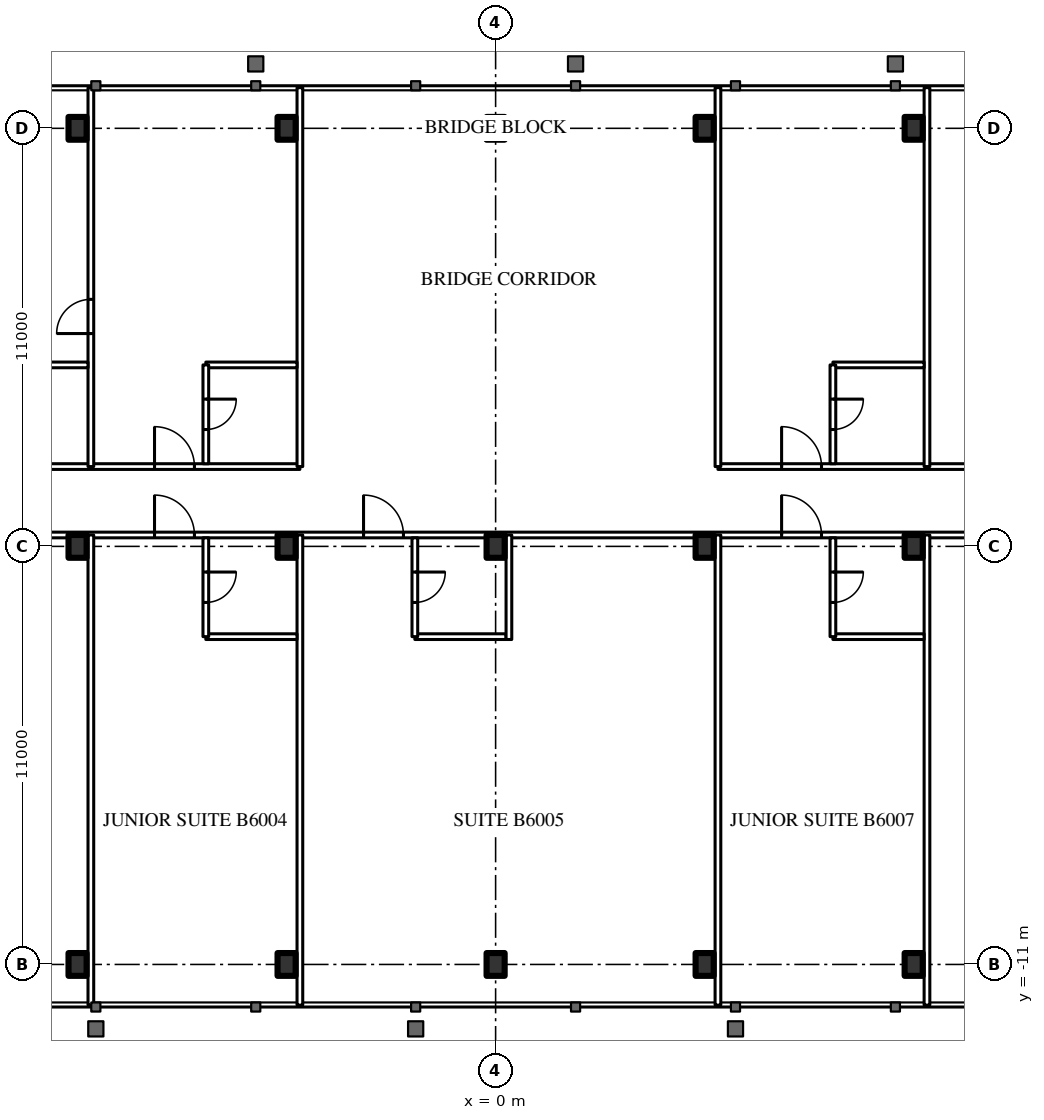
"""IFC4 building model, lengths in metres.
Left out: names, types, materials, properties, quantities, classifications, styles, units other than length and angle.
Written with IfcOpenShell. Run it as: python <this file> out.ifc"""

import sys

from ifc_helpers import new_model, si_unit, direction, frame, frame_2d, origin, origin_2d, place, context, subcontext, project, spatial, rectangle, i_section, extrude, element, fill, save


model = new_model("IFC4")
c1 = context("Model", 3, precision=1e-05, world=origin(), true_north=direction((0.0, 1.0)))
c2 = subcontext(c1, "Body", "Model", "MODEL_VIEW")
j1 = project(units=[si_unit("LENGTHUNIT", "METRE"), si_unit("PLANEANGLEUNIT", "RADIAN")], contexts=[c1])
p1 = place(None, origin())
s1 = spatial("IfcSite", under=j1, at=p1, CompositionType="ELEMENT")
p2 = place(p1, origin())
s2 = spatial("IfcBuilding", under=s1, at=p2, CompositionType="ELEMENT")
p3 = place(p2, frame((0.0, 0.0, 226.1)))
s3 = spatial("IfcBuildingStorey", under=s2, at=p3, CompositionType="ELEMENT", Elevation=226.1)
for number, where, z_axis, x_axis in (
    (1, (-11.0, -11.0, 0.0), (0.0, 0.0, 1.0), (1.0, 0.0, 0.0)),
    (2, (-5.5, -11.0, 0.0), (0.0, 0.0, 1.0), (1.0, 0.0, 0.0)),
    (3, (0.0, -11.0, 0.0), (0.0, 0.0, 1.0), (1.0, 0.0, 0.0)),
    (4, (5.5, -11.0, 0.0), (0.0, 0.0, 1.0), (1.0, 0.0, 0.0)),
    (5, (11.0, -11.0, 0.0), (0.0, 0.0, 1.0), (1.0, 0.0, 0.0)),
    (6, (-11.0, 0.0, 0.0), (0.0, 0.0, 1.0), (1.0, 0.0, 0.0)),
    (7, (-5.5, 0.0, 0.0), (0.0, 0.0, 1.0), (1.0, 0.0, 0.0)),
    (8, (0.0, 0.0, 0.0), (0.0, 0.0, 1.0), (1.0, 0.0, 0.0)),
    (9, (5.5, 0.0, 0.0), (0.0, 0.0, 1.0), (1.0, 0.0, 0.0)),
    (10, (11.0, 0.0, 0.0), (0.0, 0.0, 1.0), (1.0, 0.0, 0.0)),
    (11, (-11.0, 11.0, 0.0), (0.0, 0.0, 1.0), (1.0, 0.0, 0.0)),
    (12, (-5.5, 11.0, 0.0), (0.0, 0.0, 1.0), (1.0, 0.0, 0.0)),
    (13, (0.0, 11.0, 0.0), (0.0, 0.0, 1.0), (1.0, 0.0, 0.0)),
    (14, (5.5, 11.0, 0.0), (0.0, 0.0, 1.0), (1.0, 0.0, 0.0)),
    (15, (11.0, 11.0, 0.0), (0.0, 0.0, 1.0), (1.0, 0.0, 0.0)),
):
    element("IfcColumn", number, at=place(p3, frame(where, z_axis=z_axis, x_axis=x_axis)), inside=s3, PredefinedType="COLUMN", context=c2, shape_type="SweptSolid", body=[
        extrude(i_section(OverallWidth=0.476, OverallDepth=0.6, WebThickness=0.1, FlangeThickness=0.14, FilletRadius=0.02, at=origin_2d()), origin(), (0.0, 0.0, 1.0), 3.6),
    ])
p4 = place(p3, frame((-27.5, 0.3, 0.0), z_axis=(0.0, 0.0, 1.0), x_axis=(1.0, 0.0, 0.0)))
e16 = element("IfcWall", 16, at=p4, inside=s3, PredefinedType="PARTITIONING", context=c2, shape_type="SweptSolid", body=[
    extrude(rectangle(XDim=55.0, YDim=0.15, at=frame_2d((27.5, 0.0))), origin(), (0.0, 0.0, 1.0), 2.4),
])
p5 = place(p4, frame((1.575, 0.0, 0.0)))
e17 = element("IfcOpeningElement", 17, at=p5, cuts=e16, PredefinedType="OPENING", context=c2, shape_type="SweptSolid", body=[
    extrude(rectangle(XDim=1.0, YDim=2.2, at=frame_2d((0.5, 1.1))), frame((0.0, 0.085, 0.0), z_axis=(0.0, -1.0, 0.0), x_axis=(1.0, 0.0, 0.0)), (0.0, 0.0, 1.0), 0.17),
])
p6 = place(p4, frame((7.525, 0.0, 0.0)))
e18 = element("IfcOpeningElement", 18, at=p6, cuts=e16, PredefinedType="OPENING", context=c2, shape_type="SweptSolid", body=[
    extrude(rectangle(XDim=1.05, YDim=2.4, at=frame_2d((0.525, 1.2))), frame((0.0, 0.085, 0.0), z_axis=(0.0, -1.0, 0.0), x_axis=(1.0, 0.0, 0.0)), (0.0, 0.0, 1.0), 0.17),
])
p7 = place(p4, frame((18.525, 0.0, 0.0)))
e19 = element("IfcOpeningElement", 19, at=p7, cuts=e16, PredefinedType="OPENING", context=c2, shape_type="SweptSolid", body=[
    extrude(rectangle(XDim=1.05, YDim=2.4, at=frame_2d((0.525, 1.2))), frame((0.0, 0.085, 0.0), z_axis=(0.0, -1.0, 0.0), x_axis=(1.0, 0.0, 0.0)), (0.0, 0.0, 1.0), 0.17),
])
p8 = place(p4, frame((24.025, 0.0, 0.0)))
e20 = element("IfcOpeningElement", 20, at=p8, cuts=e16, PredefinedType="OPENING", context=c2, shape_type="SweptSolid", body=[
    extrude(rectangle(XDim=1.05, YDim=2.4, at=frame_2d((0.525, 1.2))), frame((0.0, 0.085, 0.0), z_axis=(0.0, -1.0, 0.0), x_axis=(1.0, 0.0, 0.0)), (0.0, 0.0, 1.0), 0.17),
])
p9 = place(p4, frame((35.025, 0.0, 0.0)))
e21 = element("IfcOpeningElement", 21, at=p9, cuts=e16, PredefinedType="OPENING", context=c2, shape_type="SweptSolid", body=[
    extrude(rectangle(XDim=1.05, YDim=2.4, at=frame_2d((0.525, 1.2))), frame((0.0, 0.085, 0.0), z_axis=(0.0, -1.0, 0.0), x_axis=(1.0, 0.0, 0.0)), (0.0, 0.0, 1.0), 0.17),
])
p10 = place(p4, frame((40.525, 0.0, 0.0)))
e22 = element("IfcOpeningElement", 22, at=p10, cuts=e16, PredefinedType="OPENING", context=c2, shape_type="SweptSolid", body=[
    extrude(rectangle(XDim=1.05, YDim=2.4, at=frame_2d((0.525, 1.2))), frame((0.0, 0.085, 0.0), z_axis=(0.0, -1.0, 0.0), x_axis=(1.0, 0.0, 0.0)), (0.0, 0.0, 1.0), 0.17),
])
p11 = place(p4, frame((52.525, 0.0, 0.0)))
e23 = element("IfcOpeningElement", 23, at=p11, cuts=e16, PredefinedType="OPENING", context=c2, shape_type="SweptSolid", body=[
    extrude(rectangle(XDim=1.05, YDim=2.4, at=frame_2d((0.525, 1.2))), frame((0.0, 0.085, 0.0), z_axis=(0.0, -1.0, 0.0), x_axis=(1.0, 0.0, 0.0)), (0.0, 0.0, 1.0), 0.17),
])
p12 = place(p3, frame((-27.5, 2.1, 0.0), z_axis=(0.0, 0.0, 1.0), x_axis=(1.0, 0.0, 0.0)))
e24 = element("IfcWall", 24, at=p12, inside=s3, PredefinedType="PARTITIONING", context=c2, shape_type="SweptSolid", body=[
    extrude(rectangle(XDim=22.35, YDim=0.15, at=frame_2d((11.175, 0.0))), origin(), (0.0, 0.0, 1.0), 3.4),
])
p13 = place(p12, frame((2.025, 0.0, 0.0)))
e25 = element("IfcOpeningElement", 25, at=p13, cuts=e24, PredefinedType="OPENING", context=c2, shape_type="SweptSolid", body=[
    extrude(rectangle(XDim=1.05, YDim=2.4, at=frame_2d((0.525, 1.2))), frame((0.0, 0.085, 0.0), z_axis=(0.0, -1.0, 0.0), x_axis=(1.0, 0.0, 0.0)), (0.0, 0.0, 1.0), 0.17),
])
p14 = place(p12, frame((7.525, 0.0, 0.0)))
e26 = element("IfcOpeningElement", 26, at=p14, cuts=e24, PredefinedType="OPENING", context=c2, shape_type="SweptSolid", body=[
    extrude(rectangle(XDim=1.05, YDim=2.4, at=frame_2d((0.525, 1.2))), frame((0.0, 0.085, 0.0), z_axis=(0.0, -1.0, 0.0), x_axis=(1.0, 0.0, 0.0)), (0.0, 0.0, 1.0), 0.17),
])
p15 = place(p12, frame((13.025, 0.0, 0.0)))
e27 = element("IfcOpeningElement", 27, at=p15, cuts=e24, PredefinedType="OPENING", context=c2, shape_type="SweptSolid", body=[
    extrude(rectangle(XDim=1.05, YDim=2.4, at=frame_2d((0.525, 1.2))), frame((0.0, 0.085, 0.0), z_axis=(0.0, -1.0, 0.0), x_axis=(1.0, 0.0, 0.0)), (0.0, 0.0, 1.0), 0.17),
])
p16 = place(p12, frame((18.525, 0.0, 0.0)))
e28 = element("IfcOpeningElement", 28, at=p16, cuts=e24, PredefinedType="OPENING", context=c2, shape_type="SweptSolid", body=[
    extrude(rectangle(XDim=1.05, YDim=2.4, at=frame_2d((0.525, 1.2))), frame((0.0, 0.085, 0.0), z_axis=(0.0, -1.0, 0.0), x_axis=(1.0, 0.0, 0.0)), (0.0, 0.0, 1.0), 0.17),
])
p17 = place(p3, frame((5.85, 2.1, 0.0), z_axis=(0.0, 0.0, 1.0), x_axis=(1.0, 0.0, 0.0)))
e29 = element("IfcWall", 29, at=p17, inside=s3, PredefinedType="PARTITIONING", context=c2, shape_type="SweptSolid", body=[
    extrude(rectangle(XDim=21.65, YDim=0.15, at=frame_2d((10.825, 0.0))), origin(), (0.0, 0.0, 1.0), 3.4),
])
p18 = place(p17, frame((1.675, 0.0, 0.0)))
e30 = element("IfcOpeningElement", 30, at=p18, cuts=e29, PredefinedType="OPENING", context=c2, shape_type="SweptSolid", body=[
    extrude(rectangle(XDim=1.05, YDim=2.4, at=frame_2d((0.525, 1.2))), frame((0.0, 0.085, 0.0), z_axis=(0.0, -1.0, 0.0), x_axis=(1.0, 0.0, 0.0)), (0.0, 0.0, 1.0), 0.17),
])
p19 = place(p17, frame((7.175, 0.0, 0.0)))
e31 = element("IfcOpeningElement", 31, at=p19, cuts=e29, PredefinedType="OPENING", context=c2, shape_type="SweptSolid", body=[
    extrude(rectangle(XDim=1.05, YDim=2.4, at=frame_2d((0.525, 1.2))), frame((0.0, 0.085, 0.0), z_axis=(0.0, -1.0, 0.0), x_axis=(1.0, 0.0, 0.0)), (0.0, 0.0, 1.0), 0.17),
])
p20 = place(p17, frame((19.175, 0.0, 0.0)))
e32 = element("IfcOpeningElement", 32, at=p20, cuts=e29, PredefinedType="OPENING", context=c2, shape_type="SweptSolid", body=[
    extrude(rectangle(XDim=1.05, YDim=2.4, at=frame_2d((0.525, 1.2))), frame((0.0, 0.085, 0.0), z_axis=(0.0, -1.0, 0.0), x_axis=(1.0, 0.0, 0.0)), (0.0, 0.0, 1.0), 0.17),
])
for number, where, z_axis, x_axis in (
    (33, (-10.65, -12.07, 0.0), (0.0, 0.0, 1.0), (0.0, 1.0, 0.0)),
    (34, (-5.15, -12.07, 0.0), (0.0, 0.0, 1.0), (0.0, 1.0, 0.0)),
    (35, (5.85, -12.07, 0.0), (0.0, 0.0, 1.0), (0.0, 1.0, 0.0)),
    (36, (11.35, -12.07, 0.0), (0.0, 0.0, 1.0), (0.0, 1.0, 0.0)),
):
    element("IfcWall", number, at=place(p3, frame(where, z_axis=z_axis, x_axis=x_axis)), inside=s3, PredefinedType="PARTITIONING", context=c2, shape_type="SweptSolid", body=[
        extrude(rectangle(XDim=12.37, YDim=0.15, at=frame_2d((6.185, 0.0))), origin(), (0.0, 0.0, 1.0), 3.4),
    ])
p21 = place(p3, frame((-7.625, -2.375, 0.0), z_axis=(0.0, 0.0, 1.0), x_axis=(1.0, 0.0, 0.0)))
e37 = element("IfcWall", 37, at=p21, inside=s3, PredefinedType="PARTITIONING", context=c2, shape_type="SweptSolid", body=[
    extrude(rectangle(XDim=2.4, YDim=0.15, at=frame_2d((1.2, 0.0))), origin(), (0.0, 0.0, 1.0), 3.4),
])
p22 = place(p3, frame((-7.625, -2.375, 0.0), z_axis=(0.0, 0.0, 1.0), x_axis=(0.0, 1.0, 0.0)))
e38 = element("IfcWall", 38, at=p22, inside=s3, PredefinedType="PARTITIONING", context=c2, shape_type="SweptSolid", body=[
    extrude(rectangle(XDim=2.6, YDim=0.15, at=frame_2d((1.3, 0.0))), origin(), (0.0, 0.0, 1.0), 3.4),
])
p23 = place(p22, frame((0.9, 0.0, 0.0)))
e39 = element("IfcOpeningElement", 39, at=p23, cuts=e38, PredefinedType="OPENING", context=c2, shape_type="SweptSolid", body=[
    extrude(rectangle(XDim=0.8, YDim=2.2, at=frame_2d((0.4, 1.1))), frame((0.0, 0.085, 0.0), z_axis=(0.0, -1.0, 0.0), x_axis=(1.0, 0.0, 0.0)), (0.0, 0.0, 1.0), 0.17),
])
p24 = place(p3, frame((-2.125, -2.375, 0.0), z_axis=(0.0, 0.0, 1.0), x_axis=(1.0, 0.0, 0.0)))
e40 = element("IfcWall", 40, at=p24, inside=s3, PredefinedType="PARTITIONING", context=c2, shape_type="SweptSolid", body=[
    extrude(rectangle(XDim=2.4, YDim=0.15, at=frame_2d((1.2, 0.0))), origin(), (0.0, 0.0, 1.0), 3.4),
])
p25 = place(p3, frame((-2.125, -2.375, 0.0), z_axis=(0.0, 0.0, 1.0), x_axis=(0.0, 1.0, 0.0)))
e41 = element("IfcWall", 41, at=p25, inside=s3, PredefinedType="PARTITIONING", context=c2, shape_type="SweptSolid", body=[
    extrude(rectangle(XDim=2.6, YDim=0.15, at=frame_2d((1.3, 0.0))), origin(), (0.0, 0.0, 1.0), 3.4),
])
p26 = place(p25, frame((0.9, 0.0, 0.0)))
e42 = element("IfcOpeningElement", 42, at=p26, cuts=e41, PredefinedType="OPENING", context=c2, shape_type="SweptSolid", body=[
    extrude(rectangle(XDim=0.8, YDim=2.2, at=frame_2d((0.4, 1.1))), frame((0.0, 0.085, 0.0), z_axis=(0.0, -1.0, 0.0), x_axis=(1.0, 0.0, 0.0)), (0.0, 0.0, 1.0), 0.17),
])
p27 = place(p3, frame((8.875, -2.375, 0.0), z_axis=(0.0, 0.0, 1.0), x_axis=(1.0, 0.0, 0.0)))
e43 = element("IfcWall", 43, at=p27, inside=s3, PredefinedType="PARTITIONING", context=c2, shape_type="SweptSolid", body=[
    extrude(rectangle(XDim=2.4, YDim=0.15, at=frame_2d((1.2, 0.0))), origin(), (0.0, 0.0, 1.0), 3.4),
])
p28 = place(p3, frame((8.875, -2.375, 0.0), z_axis=(0.0, 0.0, 1.0), x_axis=(0.0, 1.0, 0.0)))
e44 = element("IfcWall", 44, at=p28, inside=s3, PredefinedType="PARTITIONING", context=c2, shape_type="SweptSolid", body=[
    extrude(rectangle(XDim=2.6, YDim=0.15, at=frame_2d((1.3, 0.0))), origin(), (0.0, 0.0, 1.0), 3.4),
])
p29 = place(p28, frame((0.9, 0.0, 0.0)))
e45 = element("IfcOpeningElement", 45, at=p29, cuts=e44, PredefinedType="OPENING", context=c2, shape_type="SweptSolid", body=[
    extrude(rectangle(XDim=0.8, YDim=2.2, at=frame_2d((0.4, 1.1))), frame((0.0, 0.085, 0.0), z_axis=(0.0, -1.0, 0.0), x_axis=(1.0, 0.0, 0.0)), (0.0, 0.0, 1.0), 0.17),
])
p30 = place(p3, frame((-10.65, 2.1, 0.0), z_axis=(0.0, 0.0, 1.0), x_axis=(0.0, 1.0, 0.0)))
e46 = element("IfcWall", 46, at=p30, inside=s3, PredefinedType="PARTITIONING", context=c2, shape_type="SweptSolid", body=[
    extrude(rectangle(XDim=9.97, YDim=0.15, at=frame_2d((4.985, 0.0))), origin(), (0.0, 0.0, 1.0), 3.4),
])
p31 = place(p30, frame((3.5, 0.0, 0.0)))
e47 = element("IfcOpeningElement", 47, at=p31, cuts=e46, PredefinedType="OPENING", context=c2, shape_type="SweptSolid", body=[
    extrude(rectangle(XDim=0.9, YDim=2.2, at=frame_2d((0.45, 1.1))), frame((0.0, 0.085, 0.0), z_axis=(0.0, -1.0, 0.0), x_axis=(1.0, 0.0, 0.0)), (0.0, 0.0, 1.0), 0.17),
])
for number, where, z_axis, x_axis in (
    (48, (-5.15, 2.1, 0.0), (0.0, 0.0, 1.0), (0.0, 1.0, 0.0)),
    (49, (5.85, 2.1, 0.0), (0.0, 0.0, 1.0), (0.0, 1.0, 0.0)),
    (50, (11.35, 2.1, 0.0), (0.0, 0.0, 1.0), (0.0, 1.0, 0.0)),
):
    element("IfcWall", number, at=place(p3, frame(where, z_axis=z_axis, x_axis=x_axis)), inside=s3, PredefinedType="PARTITIONING", context=c2, shape_type="SweptSolid", body=[
        extrude(rectangle(XDim=9.97, YDim=0.15, at=frame_2d((4.985, 0.0))), origin(), (0.0, 0.0, 1.0), 3.4),
    ])
for number, where, z_axis, x_axis in (
    (51, (-13.125, 4.775, 0.0), (0.0, 0.0, 1.0), (1.0, 0.0, 0.0)),
    (52, (-7.625, 4.775, 0.0), (0.0, 0.0, 1.0), (1.0, 0.0, 0.0)),
):
    element("IfcWall", number, at=place(p3, frame(where, z_axis=z_axis, x_axis=x_axis)), inside=s3, PredefinedType="PARTITIONING", context=c2, shape_type="SweptSolid", body=[
        extrude(rectangle(XDim=2.4, YDim=0.15, at=frame_2d((1.2, 0.0))), origin(), (0.0, 0.0, 1.0), 3.4),
    ])
p32 = place(p3, frame((-7.625, 2.175, 0.0), z_axis=(0.0, 0.0, 1.0), x_axis=(0.0, 1.0, 0.0)))
e53 = element("IfcWall", 53, at=p32, inside=s3, PredefinedType="PARTITIONING", context=c2, shape_type="SweptSolid", body=[
    extrude(rectangle(XDim=2.6, YDim=0.15, at=frame_2d((1.3, 0.0))), origin(), (0.0, 0.0, 1.0), 3.4),
])
p33 = place(p32, frame((0.9, 0.0, 0.0)))
e54 = element("IfcOpeningElement", 54, at=p33, cuts=e53, PredefinedType="OPENING", context=c2, shape_type="SweptSolid", body=[
    extrude(rectangle(XDim=0.8, YDim=2.2, at=frame_2d((0.4, 1.1))), frame((0.0, 0.085, 0.0), z_axis=(0.0, -1.0, 0.0), x_axis=(1.0, 0.0, 0.0)), (0.0, 0.0, 1.0), 0.17),
])
p34 = place(p3, frame((8.875, 4.775, 0.0), z_axis=(0.0, 0.0, 1.0), x_axis=(1.0, 0.0, 0.0)))
e55 = element("IfcWall", 55, at=p34, inside=s3, PredefinedType="PARTITIONING", context=c2, shape_type="SweptSolid", body=[
    extrude(rectangle(XDim=2.4, YDim=0.15, at=frame_2d((1.2, 0.0))), origin(), (0.0, 0.0, 1.0), 3.4),
])
p35 = place(p3, frame((8.875, 2.175, 0.0), z_axis=(0.0, 0.0, 1.0), x_axis=(0.0, 1.0, 0.0)))
e56 = element("IfcWall", 56, at=p35, inside=s3, PredefinedType="PARTITIONING", context=c2, shape_type="SweptSolid", body=[
    extrude(rectangle(XDim=2.6, YDim=0.15, at=frame_2d((1.3, 0.0))), origin(), (0.0, 0.0, 1.0), 3.4),
])
p36 = place(p35, frame((0.9, 0.0, 0.0)))
e57 = element("IfcOpeningElement", 57, at=p36, cuts=e56, PredefinedType="OPENING", context=c2, shape_type="SweptSolid", body=[
    extrude(rectangle(XDim=0.8, YDim=2.2, at=frame_2d((0.4, 1.1))), frame((0.0, 0.085, 0.0), z_axis=(0.0, -1.0, 0.0), x_axis=(1.0, 0.0, 0.0)), (0.0, 0.0, 1.0), 0.17),
])
p37 = place(p3, frame((0.35, -2.45, 0.0), z_axis=(0.0, 0.0, 1.0), x_axis=(0.0, 1.0, 0.0)))
e58 = element("IfcWall", 58, at=p37, inside=s3, PredefinedType="PARTITIONING", context=c2, shape_type="SweptSolid", body=[
    extrude(rectangle(XDim=2.75, YDim=0.15, at=frame_2d((1.375, 0.0))), origin(), (0.0, 0.0, 1.0), 3.4),
])
p38 = place(p23, origin())
e59 = element("IfcDoor", 59, at=p38, inside=s3, OperationType="SINGLE_SWING_RIGHT", PredefinedType="DOOR", context=c2, shape_type="SweptSolid", body=[
    extrude(rectangle(XDim=0.8, YDim=2.2, at=frame_2d((0.4, 1.1))), frame((0.0, 0.025, 0.0), z_axis=(0.0, -1.0, 0.0), x_axis=(1.0, 0.0, 0.0)), (0.0, 0.0, 1.0), 0.05),
])
fill(e39, e59)
p39 = place(p7, origin())
e60 = element("IfcDoor", 60, at=p39, inside=s3, OperationType="SINGLE_SWING_LEFT", PredefinedType="DOOR", context=c2, shape_type="SweptSolid", body=[
    extrude(rectangle(XDim=1.05, YDim=2.4, at=frame_2d((0.525, 1.2))), frame((0.0, 0.025, 0.0), z_axis=(0.0, -1.0, 0.0), x_axis=(1.0, 0.0, 0.0)), (0.0, 0.0, 1.0), 0.05),
])
fill(e19, e60)
p40 = place(p26, origin())
e61 = element("IfcDoor", 61, at=p40, inside=s3, OperationType="SINGLE_SWING_RIGHT", PredefinedType="DOOR", context=c2, shape_type="SweptSolid", body=[
    extrude(rectangle(XDim=0.8, YDim=2.2, at=frame_2d((0.4, 1.1))), frame((0.0, 0.025, 0.0), z_axis=(0.0, -1.0, 0.0), x_axis=(1.0, 0.0, 0.0)), (0.0, 0.0, 1.0), 0.05),
])
fill(e42, e61)
p41 = place(p8, origin())
e62 = element("IfcDoor", 62, at=p41, inside=s3, OperationType="SINGLE_SWING_LEFT", PredefinedType="DOOR", context=c2, shape_type="SweptSolid", body=[
    extrude(rectangle(XDim=1.05, YDim=2.4, at=frame_2d((0.525, 1.2))), frame((0.0, 0.025, 0.0), z_axis=(0.0, -1.0, 0.0), x_axis=(1.0, 0.0, 0.0)), (0.0, 0.0, 1.0), 0.05),
])
fill(e20, e62)
p42 = place(p29, origin())
e63 = element("IfcDoor", 63, at=p42, inside=s3, OperationType="SINGLE_SWING_RIGHT", PredefinedType="DOOR", context=c2, shape_type="SweptSolid", body=[
    extrude(rectangle(XDim=0.8, YDim=2.2, at=frame_2d((0.4, 1.1))), frame((0.0, 0.025, 0.0), z_axis=(0.0, -1.0, 0.0), x_axis=(1.0, 0.0, 0.0)), (0.0, 0.0, 1.0), 0.05),
])
fill(e45, e63)
p43 = place(p9, origin())
e64 = element("IfcDoor", 64, at=p43, inside=s3, OperationType="SINGLE_SWING_LEFT", PredefinedType="DOOR", context=c2, shape_type="SweptSolid", body=[
    extrude(rectangle(XDim=1.05, YDim=2.4, at=frame_2d((0.525, 1.2))), frame((0.0, 0.025, 0.0), z_axis=(0.0, -1.0, 0.0), x_axis=(1.0, 0.0, 0.0)), (0.0, 0.0, 1.0), 0.05),
])
fill(e21, e64)
p44 = place(p33, origin())
e65 = element("IfcDoor", 65, at=p44, inside=s3, OperationType="SINGLE_SWING_RIGHT", PredefinedType="DOOR", context=c2, shape_type="SweptSolid", body=[
    extrude(rectangle(XDim=0.8, YDim=2.2, at=frame_2d((0.4, 1.1))), frame((0.0, 0.025, 0.0), z_axis=(0.0, -1.0, 0.0), x_axis=(1.0, 0.0, 0.0)), (0.0, 0.0, 1.0), 0.05),
])
fill(e54, e65)
p45 = place(p16, origin())
e66 = element("IfcDoor", 66, at=p45, inside=s3, OperationType="SINGLE_SWING_LEFT", PredefinedType="DOOR", context=c2, shape_type="SweptSolid", body=[
    extrude(rectangle(XDim=1.05, YDim=2.4, at=frame_2d((0.525, 1.2))), frame((0.0, 0.025, 0.0), z_axis=(0.0, -1.0, 0.0), x_axis=(1.0, 0.0, 0.0)), (0.0, 0.0, 1.0), 0.05),
])
fill(e28, e66)
p46 = place(p36, origin())
e67 = element("IfcDoor", 67, at=p46, inside=s3, OperationType="SINGLE_SWING_RIGHT", PredefinedType="DOOR", context=c2, shape_type="SweptSolid", body=[
    extrude(rectangle(XDim=0.8, YDim=2.2, at=frame_2d((0.4, 1.1))), frame((0.0, 0.025, 0.0), z_axis=(0.0, -1.0, 0.0), x_axis=(1.0, 0.0, 0.0)), (0.0, 0.0, 1.0), 0.05),
])
fill(e57, e67)
p47 = place(p18, origin())
e68 = element("IfcDoor", 68, at=p47, inside=s3, OperationType="SINGLE_SWING_LEFT", PredefinedType="DOOR", context=c2, shape_type="SweptSolid", body=[
    extrude(rectangle(XDim=1.05, YDim=2.4, at=frame_2d((0.525, 1.2))), frame((0.0, 0.025, 0.0), z_axis=(0.0, -1.0, 0.0), x_axis=(1.0, 0.0, 0.0)), (0.0, 0.0, 1.0), 0.05),
])
fill(e30, e68)
p48 = place(p31, origin())
e69 = element("IfcDoor", 69, at=p48, inside=s3, OperationType="SINGLE_SWING_LEFT", PredefinedType="DOOR", context=c2, shape_type="SweptSolid", body=[
    extrude(rectangle(XDim=0.9, YDim=2.2, at=frame_2d((0.45, 1.1))), frame((0.0, 0.025, 0.0), z_axis=(0.0, -1.0, 0.0), x_axis=(1.0, 0.0, 0.0)), (0.0, 0.0, 1.0), 0.05),
])
fill(e47, e69)
save(model, sys.argv[1])
